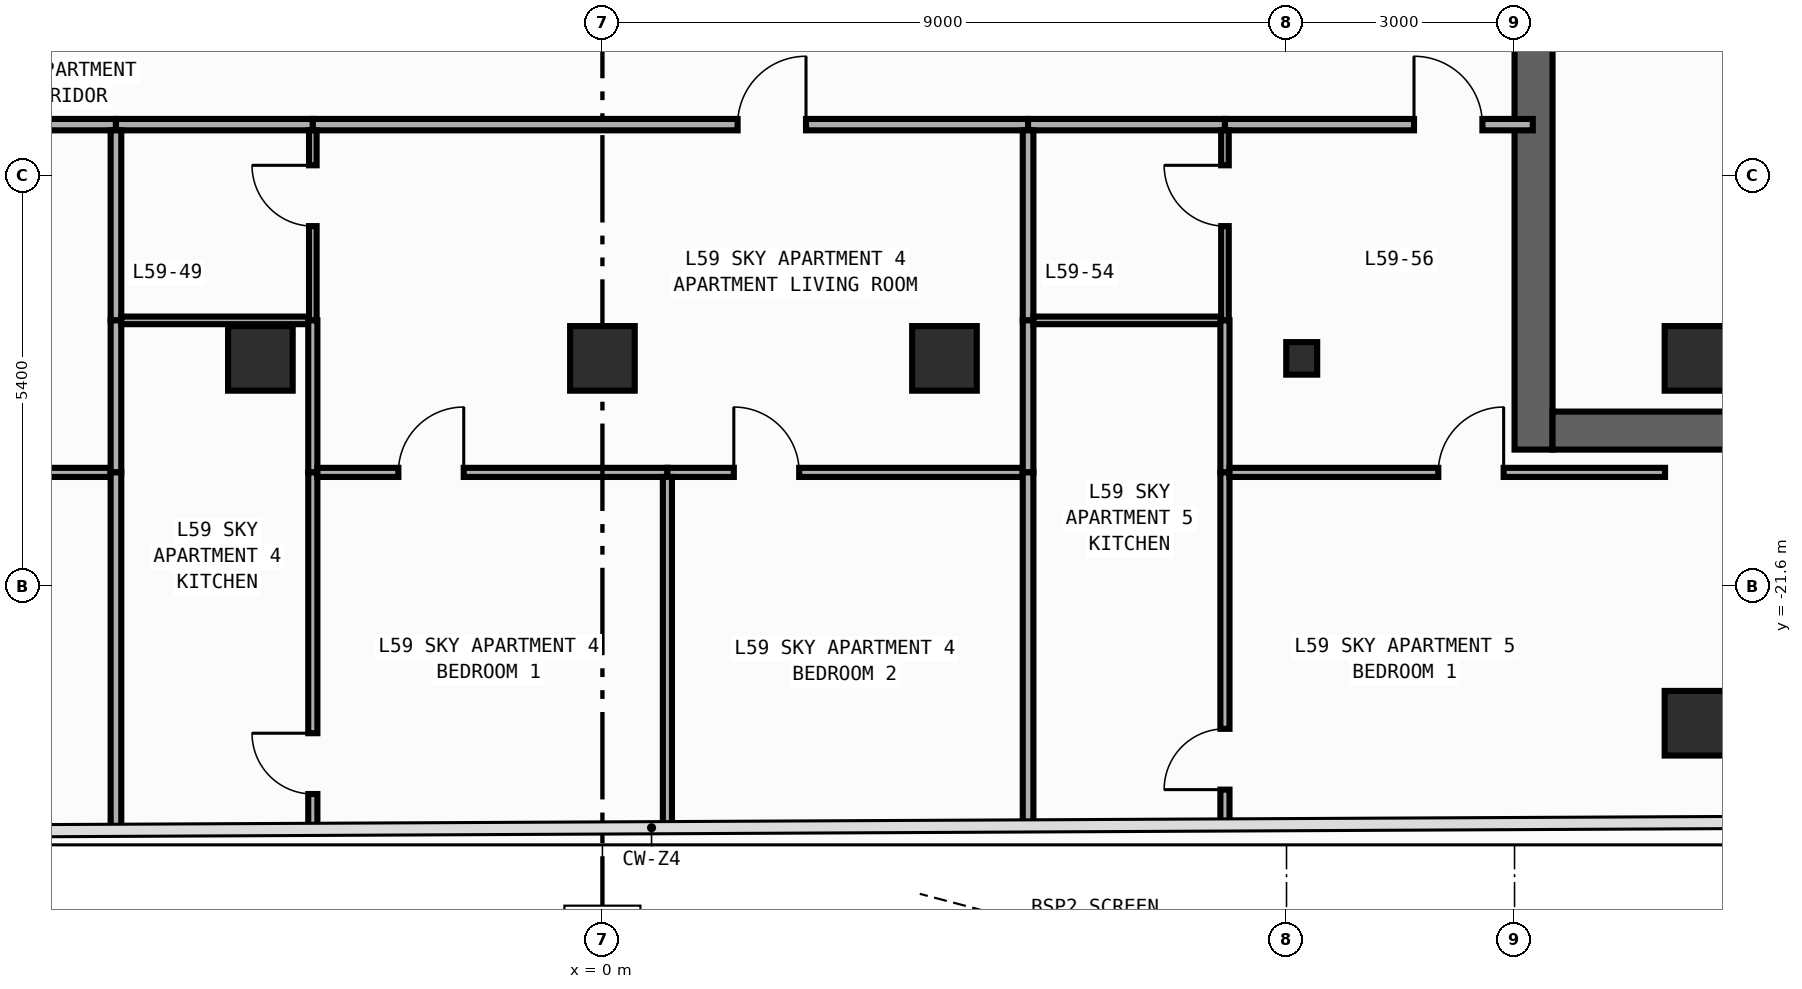
"""IFC4 building model, lengths in metres.
Left out: names, types, materials, properties, quantities, classifications, styles, units other than length and angle.
Written with IfcOpenShell. Run it as: python <this file> out.ifc"""

import sys

from ifc_helpers import new_model, si_unit, direction, frame, frame_2d, origin, origin_2d, place, context, subcontext, project, spatial, rectangle, i_section, extrude, element, fill, save


model = new_model("IFC4")
c1 = context("Model", 3, precision=1e-05, world=origin(), true_north=direction((0.0, 1.0)))
c2 = subcontext(c1, "Body", "Model", "MODEL_VIEW")
j1 = project(units=[si_unit("LENGTHUNIT", "METRE"), si_unit("PLANEANGLEUNIT", "RADIAN")], contexts=[c1])
p1 = place(None, origin())
s1 = spatial("IfcSite", under=j1, at=p1, CompositionType="ELEMENT")
p2 = place(p1, origin())
s2 = spatial("IfcBuilding", under=s1, at=p2, CompositionType="ELEMENT")
p3 = place(p2, frame((0.0, 0.0, 251.2)))
s3 = spatial("IfcBuildingStorey", under=s2, at=p3, CompositionType="ELEMENT", Elevation=251.2)
p4 = place(p3, frame((12.25, -19.8, 0.0), z_axis=(0.0, 0.0, 1.0), x_axis=(0.0, 1.0, 0.0)))
e1 = element("IfcWall", 1, at=p4, inside=s3, PredefinedType="SHEAR", context=c2, shape_type="SweptSolid", body=[
    extrude(rectangle(XDim=27.0, YDim=0.5, at=frame_2d((13.5, 0.0))), origin(), (0.0, 0.0, 1.0), 3.34),
])
p5 = place(p4, frame((23.05, 0.0, 0.0)))
e2 = element("IfcOpeningElement", 2, at=p5, cuts=e1, PredefinedType="OPENING", context=c2, shape_type="SweptSolid", body=[
    extrude(rectangle(XDim=1.1, YDim=2.2, at=frame_2d((0.55, 1.1))), frame((0.0, 0.26, 0.0), z_axis=(0.0, -1.0, 0.0), x_axis=(1.0, 0.0, 0.0)), (0.0, 0.0, 1.0), 0.52),
])
p6 = place(p4, frame((19.85, 0.0, 0.0)))
e3 = element("IfcOpeningElement", 3, at=p6, cuts=e1, PredefinedType="OPENING", context=c2, shape_type="SweptSolid", body=[
    extrude(rectangle(XDim=1.1, YDim=2.2, at=frame_2d((0.55, 1.1))), frame((0.0, 0.26, 0.0), z_axis=(0.0, -1.0, 0.0), x_axis=(1.0, 0.0, 0.0)), (0.0, 0.0, 1.0), 0.52),
])
p7 = place(p4, frame((16.65, 0.0, 0.0)))
e4 = element("IfcOpeningElement", 4, at=p7, cuts=e1, PredefinedType="OPENING", context=c2, shape_type="SweptSolid", body=[
    extrude(rectangle(XDim=1.1, YDim=2.2, at=frame_2d((0.55, 1.1))), frame((0.0, 0.26, 0.0), z_axis=(0.0, -1.0, 0.0), x_axis=(1.0, 0.0, 0.0)), (0.0, 0.0, 1.0), 0.52),
])
p8 = place(p4, frame((10.175, 0.0, 0.0)))
e5 = element("IfcOpeningElement", 5, at=p8, cuts=e1, PredefinedType="OPENING", context=c2, shape_type="SweptSolid", body=[
    extrude(rectangle(XDim=0.85, YDim=2.1, at=frame_2d((0.425, 1.05))), frame((0.0, 0.26, 0.0), z_axis=(0.0, -1.0, 0.0), x_axis=(1.0, 0.0, 0.0)), (0.0, 0.0, 1.0), 0.52),
])
p9 = place(p4, frame((12.725, 0.0, 0.0)))
e6 = element("IfcOpeningElement", 6, at=p9, cuts=e1, PredefinedType="OPENING", context=c2, shape_type="SweptSolid", body=[
    extrude(rectangle(XDim=1.15, YDim=2.2, at=frame_2d((0.575, 1.1))), frame((0.0, 0.26, 0.0), z_axis=(0.0, -1.0, 0.0), x_axis=(1.0, 0.0, 0.0)), (0.0, 0.0, 1.0), 0.52),
])
p10 = place(p4, frame((25.125, 0.0, 0.0)))
e7 = element("IfcOpeningElement", 7, at=p10, cuts=e1, PredefinedType="OPENING", context=c2, shape_type="SweptSolid", body=[
    extrude(rectangle(XDim=0.85, YDim=2.1, at=frame_2d((0.425, 1.05))), frame((0.0, 0.26, 0.0), z_axis=(0.0, -1.0, 0.0), x_axis=(1.0, 0.0, 0.0)), (0.0, 0.0, 1.0), 0.52),
])
p11 = place(p3, frame((12.5, -19.55, 0.0), z_axis=(0.0, 0.0, 1.0), x_axis=(1.0, 0.0, 0.0)))
e8 = element("IfcWall", 8, at=p11, inside=s3, PredefinedType="SHEAR", context=c2, shape_type="SweptSolid", body=[
    extrude(rectangle(XDim=7.4, YDim=0.5, at=frame_2d((3.7, 0.0))), origin(), (0.0, 0.0, 1.0), 3.34),
])
p12 = place(p3, frame((9.2, -18.6, 0.0), z_axis=(0.0, 0.0, 1.0), x_axis=(1.0, 0.0, 0.0)))
e9 = element("IfcColumn", 9, at=p12, inside=s3, PredefinedType="COLUMN", context=c2, shape_type="SweptSolid", body=[
    extrude(i_section(OverallWidth=0.407, OverallDepth=0.428, WebThickness=0.02, FlangeThickness=0.035, FilletRadius=0.022, at=origin_2d()), origin(), (0.0, 0.0, 1.0), 3.6),
])
for number, where, z_axis, x_axis in (
    (10, (14.4, -18.6, 0.0), (0.0, 0.0, 1.0), (1.0, 0.0, 0.0)),
    (11, (-4.5, -18.6, 0.0), (0.0, 0.0, 1.0), (1.0, 0.0, 0.0)),
    (12, (0.0, -18.6, 0.0), (0.0, 0.0, 1.0), (1.0, 0.0, 0.0)),
    (13, (4.5, -18.6, 0.0), (0.0, 0.0, 1.0), (1.0, 0.0, 0.0)),
    (14, (14.4, -23.4, 0.0), (0.0, 0.0, 1.0), (1.0, 0.0, 0.0)),
):
    element("IfcColumn", number, at=place(p3, frame(where, z_axis=z_axis, x_axis=x_axis)), inside=s3, PredefinedType="COLUMN", context=c2, shape_type="SweptSolid", body=[
        extrude(rectangle(XDim=0.85, YDim=0.85, at=origin_2d()), origin(), (0.0, 0.0, 1.0), 3.6),
    ])
p13 = place(p3, frame((-19.31, -15.525, 0.0), z_axis=(0.0, 0.0, 1.0), x_axis=(1.0, 0.0, 0.0)))
e15 = element("IfcWall", 15, at=p13, inside=s3, PredefinedType="PARTITIONING", context=c2, shape_type="SweptSolid", body=[
    extrude(rectangle(XDim=12.91, YDim=0.15, at=frame_2d((6.455, 0.0))), origin(), (0.0, 0.0, 1.0), 3.34),
])
p14 = place(p13, frame((1.468, 0.0, 0.0)))
e16 = element("IfcOpeningElement", 16, at=p14, cuts=e15, PredefinedType="OPENING", context=c2, shape_type="SweptSolid", body=[
    extrude(rectangle(XDim=0.9, YDim=2.15, at=frame_2d((0.45, 1.075))), frame((0.0, 0.085, 0.0), z_axis=(0.0, -1.0, 0.0), x_axis=(1.0, 0.0, 0.0)), (0.0, 0.0, 1.0), 0.17),
])
p15 = place(p3, frame((-6.4, -15.525, 0.0), z_axis=(0.0, 0.0, 1.0), x_axis=(1.0, 0.0, 0.0)))
e17 = element("IfcWall", 17, at=p15, inside=s3, PredefinedType="PARTITIONING", context=c2, shape_type="SweptSolid", body=[
    extrude(rectangle(XDim=2.59, YDim=0.15, at=frame_2d((1.295, 0.0))), origin(), (0.0, 0.0, 1.0), 3.34),
])
p16 = place(p3, frame((-3.81, -15.525, 0.0), z_axis=(0.0, 0.0, 1.0), x_axis=(1.0, 0.0, 0.0)))
e18 = element("IfcWall", 18, at=p16, inside=s3, PredefinedType="PARTITIONING", context=c2, shape_type="SweptSolid", body=[
    extrude(rectangle(XDim=9.41, YDim=0.15, at=frame_2d((4.705, 0.0))), origin(), (0.0, 0.0, 1.0), 3.34),
])
p17 = place(p16, frame((5.588, 0.0, 0.0)))
e19 = element("IfcOpeningElement", 19, at=p17, cuts=e18, PredefinedType="OPENING", context=c2, shape_type="SweptSolid", body=[
    extrude(rectangle(XDim=0.9, YDim=2.15, at=frame_2d((0.45, 1.075))), frame((0.0, 0.085, 0.0), z_axis=(0.0, -1.0, 0.0), x_axis=(1.0, 0.0, 0.0)), (0.0, 0.0, 1.0), 0.17),
])
p18 = place(p3, frame((5.6, -15.525, 0.0), z_axis=(0.0, 0.0, 1.0), x_axis=(1.0, 0.0, 0.0)))
e20 = element("IfcWall", 20, at=p18, inside=s3, PredefinedType="PARTITIONING", context=c2, shape_type="SweptSolid", body=[
    extrude(rectangle(XDim=2.59, YDim=0.15, at=frame_2d((1.295, 0.0))), origin(), (0.0, 0.0, 1.0), 3.34),
])
p19 = place(p3, frame((8.19, -15.525, 0.0), z_axis=(0.0, 0.0, 1.0), x_axis=(1.0, 0.0, 0.0)))
e21 = element("IfcWall", 21, at=p19, inside=s3, PredefinedType="PARTITIONING", context=c2, shape_type="SweptSolid", body=[
    extrude(rectangle(XDim=4.05, YDim=0.15, at=frame_2d((2.025, 0.0))), origin(), (0.0, 0.0, 1.0), 3.34),
])
p20 = place(p19, frame((2.487, 0.0, 0.0)))
e22 = element("IfcOpeningElement", 22, at=p20, cuts=e21, PredefinedType="OPENING", context=c2, shape_type="SweptSolid", body=[
    extrude(rectangle(XDim=0.9, YDim=2.15, at=frame_2d((0.45, 1.075))), frame((0.0, 0.085, 0.0), z_axis=(0.0, -1.0, 0.0), x_axis=(1.0, 0.0, 0.0)), (0.0, 0.0, 1.0), 0.17),
])
p21 = place(p3, frame((-12.895, -20.1, 0.0), z_axis=(0.0, 0.0, 1.0), x_axis=(1.0, 0.0, 0.0)))
e23 = element("IfcWall", 23, at=p21, inside=s3, PredefinedType="PARTITIONING", context=c2, shape_type="SweptSolid", body=[
    extrude(rectangle(XDim=6.425, YDim=0.12, at=frame_2d((3.212, 0.0))), origin(), (0.0, 0.0, 1.0), 3.34),
])
p22 = place(p21, frame((0.864, 0.0, 0.0)))
e24 = element("IfcOpeningElement", 24, at=p22, cuts=e23, PredefinedType="OPENING", context=c2, shape_type="SweptSolid", body=[
    extrude(rectangle(XDim=0.86, YDim=2.15, at=frame_2d((0.43, 1.075))), frame((0.0, 0.07, 0.0), z_axis=(0.0, -1.0, 0.0), x_axis=(1.0, 0.0, 0.0)), (0.0, 0.0, 1.0), 0.14),
])
p23 = place(p3, frame((-6.4, -18.1, 0.0), z_axis=(0.0, 0.0, 1.0), x_axis=(0.0, 1.0, 0.0)))
e25 = element("IfcWall", 25, at=p23, inside=s3, PredefinedType="PARTITIONING", context=c2, shape_type="SweptSolid", body=[
    extrude(rectangle(XDim=2.5, YDim=0.14, at=frame_2d((1.25, 0.0))), origin(), (0.0, 0.0, 1.0), 3.34),
])
p24 = place(p3, frame((-6.4, -20.1, 0.0), z_axis=(0.0, 0.0, 1.0), x_axis=(0.0, 1.0, 0.0)))
e26 = element("IfcWall", 26, at=p24, inside=s3, PredefinedType="PARTITIONING", context=c2, shape_type="SweptSolid", body=[
    extrude(rectangle(XDim=2.0, YDim=0.14, at=frame_2d((1.0, 0.0))), origin(), (0.0, 0.0, 1.0), 3.34),
])
p25 = place(p3, frame((-6.4, -24.804, 0.0), z_axis=(0.0, 0.0, 1.0), x_axis=(0.0, 1.0, 0.0)))
e27 = element("IfcWall", 27, at=p25, inside=s3, PredefinedType="PARTITIONING", context=c2, shape_type="SweptSolid", body=[
    extrude(rectangle(XDim=4.704, YDim=0.14, at=frame_2d((2.352, 0.0))), origin(), (0.0, 0.0, 1.0), 3.34),
])
p26 = place(p3, frame((-6.33, -18.1, 0.0), z_axis=(0.0, 0.0, 1.0), x_axis=(1.0, 0.0, 0.0)))
e28 = element("IfcWall", 28, at=p26, inside=s3, PredefinedType="PARTITIONING", context=c2, shape_type="SweptSolid", body=[
    extrude(rectangle(XDim=2.47, YDim=0.1, at=frame_2d((1.235, 0.0))), origin(), (0.0, 0.0, 1.0), 3.34),
])
p27 = place(p3, frame((-3.81, -18.1, 0.0), z_axis=(0.0, 0.0, 1.0), x_axis=(0.0, 1.0, 0.0)))
e29 = element("IfcWall", 29, at=p27, inside=s3, PredefinedType="PARTITIONING", context=c2, shape_type="SweptSolid", body=[
    extrude(rectangle(XDim=2.5, YDim=0.1, at=frame_2d((1.25, 0.0))), origin(), (0.0, 0.0, 1.0), 3.34),
])
p28 = place(p27, frame((1.24, 0.0, 0.0)))
e30 = element("IfcOpeningElement", 30, at=p28, cuts=e29, PredefinedType="OPENING", context=c2, shape_type="SweptSolid", body=[
    extrude(rectangle(XDim=0.8, YDim=2.1, at=frame_2d((0.4, 1.05))), frame((0.0, 0.06, 0.0), z_axis=(0.0, -1.0, 0.0), x_axis=(1.0, 0.0, 0.0)), (0.0, 0.0, 1.0), 0.12),
])
p29 = place(p3, frame((-3.81, -20.1, 0.0), z_axis=(0.0, 0.0, 1.0), x_axis=(0.0, 1.0, 0.0)))
e31 = element("IfcWall", 31, at=p29, inside=s3, PredefinedType="PARTITIONING", context=c2, shape_type="SweptSolid", body=[
    extrude(rectangle(XDim=2.0, YDim=0.12, at=frame_2d((1.0, 0.0))), origin(), (0.0, 0.0, 1.0), 3.34),
])
p30 = place(p3, frame((-3.81, -24.792, 0.0), z_axis=(0.0, 0.0, 1.0), x_axis=(0.0, 1.0, 0.0)))
e32 = element("IfcWall", 32, at=p30, inside=s3, PredefinedType="PARTITIONING", context=c2, shape_type="SweptSolid", body=[
    extrude(rectangle(XDim=4.691, YDim=0.12, at=frame_2d((2.346, 0.0))), origin(), (0.0, 0.0, 1.0), 3.34),
])
p31 = place(p30, frame((0.46, 0.0, 0.0)))
e33 = element("IfcOpeningElement", 33, at=p31, cuts=e32, PredefinedType="OPENING", context=c2, shape_type="SweptSolid", body=[
    extrude(rectangle(XDim=0.8, YDim=2.1, at=frame_2d((0.4, 1.05))), frame((0.0, 0.07, 0.0), z_axis=(0.0, -1.0, 0.0), x_axis=(1.0, 0.0, 0.0)), (0.0, 0.0, 1.0), 0.14),
])
p32 = place(p3, frame((-3.75, -20.1, 0.0), z_axis=(0.0, 0.0, 1.0), x_axis=(1.0, 0.0, 0.0)))
e34 = element("IfcWall", 34, at=p32, inside=s3, PredefinedType="PARTITIONING", context=c2, shape_type="SweptSolid", body=[
    extrude(rectangle(XDim=4.605, YDim=0.12, at=frame_2d((2.302, 0.0))), origin(), (0.0, 0.0, 1.0), 3.34),
])
p33 = place(p32, frame((1.065, 0.0, 0.0)))
e35 = element("IfcOpeningElement", 35, at=p33, cuts=e34, PredefinedType="OPENING", context=c2, shape_type="SweptSolid", body=[
    extrude(rectangle(XDim=0.86, YDim=2.15, at=frame_2d((0.43, 1.075))), frame((0.0, 0.07, 0.0), z_axis=(0.0, -1.0, 0.0), x_axis=(1.0, 0.0, 0.0)), (0.0, 0.0, 1.0), 0.14),
])
p34 = place(p3, frame((0.855, -20.1, 0.0), z_axis=(0.0, 0.0, 1.0), x_axis=(1.0, 0.0, 0.0)))
e36 = element("IfcWall", 36, at=p34, inside=s3, PredefinedType="PARTITIONING", context=c2, shape_type="SweptSolid", body=[
    extrude(rectangle(XDim=4.675, YDim=0.12, at=frame_2d((2.337, 0.0))), origin(), (0.0, 0.0, 1.0), 3.34),
])
p35 = place(p34, frame((0.874, 0.0, 0.0)))
e37 = element("IfcOpeningElement", 37, at=p35, cuts=e36, PredefinedType="OPENING", context=c2, shape_type="SweptSolid", body=[
    extrude(rectangle(XDim=0.86, YDim=2.15, at=frame_2d((0.43, 1.075))), frame((0.0, 0.07, 0.0), z_axis=(0.0, -1.0, 0.0), x_axis=(1.0, 0.0, 0.0)), (0.0, 0.0, 1.0), 0.14),
])
p36 = place(p3, frame((5.6, -18.1, 0.0), z_axis=(0.0, 0.0, 1.0), x_axis=(0.0, 1.0, 0.0)))
e38 = element("IfcWall", 38, at=p36, inside=s3, PredefinedType="PARTITIONING", context=c2, shape_type="SweptSolid", body=[
    extrude(rectangle(XDim=2.5, YDim=0.14, at=frame_2d((1.25, 0.0))), origin(), (0.0, 0.0, 1.0), 3.34),
])
p37 = place(p3, frame((5.6, -20.1, 0.0), z_axis=(0.0, 0.0, 1.0), x_axis=(0.0, 1.0, 0.0)))
e39 = element("IfcWall", 39, at=p37, inside=s3, PredefinedType="PARTITIONING", context=c2, shape_type="SweptSolid", body=[
    extrude(rectangle(XDim=2.0, YDim=0.14, at=frame_2d((1.0, 0.0))), origin(), (0.0, 0.0, 1.0), 3.34),
])
p38 = place(p3, frame((0.855, -24.769, 0.0), z_axis=(0.0, 0.0, 1.0), x_axis=(0.0, 1.0, 0.0)))
e40 = element("IfcWall", 40, at=p38, inside=s3, PredefinedType="PARTITIONING", context=c2, shape_type="SweptSolid", body=[
    extrude(rectangle(XDim=4.609, YDim=0.12, at=frame_2d((2.304, 0.0))), origin(), (0.0, 0.0, 1.0), 3.34),
])
p39 = place(p3, frame((5.6, -24.746, 0.0), z_axis=(0.0, 0.0, 1.0), x_axis=(0.0, 1.0, 0.0)))
e41 = element("IfcWall", 41, at=p39, inside=s3, PredefinedType="PARTITIONING", context=c2, shape_type="SweptSolid", body=[
    extrude(rectangle(XDim=4.646, YDim=0.14, at=frame_2d((2.323, 0.0))), origin(), (0.0, 0.0, 1.0), 3.34),
])
p40 = place(p3, frame((5.67, -18.1, 0.0), z_axis=(0.0, 0.0, 1.0), x_axis=(1.0, 0.0, 0.0)))
e42 = element("IfcWall", 42, at=p40, inside=s3, PredefinedType="PARTITIONING", context=c2, shape_type="SweptSolid", body=[
    extrude(rectangle(XDim=2.47, YDim=0.1, at=frame_2d((1.235, 0.0))), origin(), (0.0, 0.0, 1.0), 3.34),
])
p41 = place(p3, frame((8.19, -18.1, 0.0), z_axis=(0.0, 0.0, 1.0), x_axis=(0.0, 1.0, 0.0)))
e43 = element("IfcWall", 43, at=p41, inside=s3, PredefinedType="PARTITIONING", context=c2, shape_type="SweptSolid", body=[
    extrude(rectangle(XDim=2.5, YDim=0.1, at=frame_2d((1.25, 0.0))), origin(), (0.0, 0.0, 1.0), 3.34),
])
p42 = place(p41, frame((1.24, 0.0, 0.0)))
e44 = element("IfcOpeningElement", 44, at=p42, cuts=e43, PredefinedType="OPENING", context=c2, shape_type="SweptSolid", body=[
    extrude(rectangle(XDim=0.8, YDim=2.1, at=frame_2d((0.4, 1.05))), frame((0.0, 0.06, 0.0), z_axis=(0.0, -1.0, 0.0), x_axis=(1.0, 0.0, 0.0)), (0.0, 0.0, 1.0), 0.12),
])
p43 = place(p3, frame((8.19, -20.1, 0.0), z_axis=(0.0, 0.0, 1.0), x_axis=(0.0, 1.0, 0.0)))
e45 = element("IfcWall", 45, at=p43, inside=s3, PredefinedType="PARTITIONING", context=c2, shape_type="SweptSolid", body=[
    extrude(rectangle(XDim=2.0, YDim=0.12, at=frame_2d((1.0, 0.0))), origin(), (0.0, 0.0, 1.0), 3.34),
])
p44 = place(p3, frame((8.19, -24.733, 0.0), z_axis=(0.0, 0.0, 1.0), x_axis=(0.0, 1.0, 0.0)))
e46 = element("IfcWall", 46, at=p44, inside=s3, PredefinedType="PARTITIONING", context=c2, shape_type="SweptSolid", body=[
    extrude(rectangle(XDim=4.633, YDim=0.12, at=frame_2d((2.317, 0.0))), origin(), (0.0, 0.0, 1.0), 3.34),
])
p45 = place(p44, frame((0.46, 0.0, 0.0)))
e47 = element("IfcOpeningElement", 47, at=p45, cuts=e46, PredefinedType="OPENING", context=c2, shape_type="SweptSolid", body=[
    extrude(rectangle(XDim=0.8, YDim=2.1, at=frame_2d((0.4, 1.05))), frame((0.0, 0.07, 0.0), z_axis=(0.0, -1.0, 0.0), x_axis=(1.0, 0.0, 0.0)), (0.0, 0.0, 1.0), 0.14),
])
p46 = place(p3, frame((8.25, -20.1, 0.0), z_axis=(0.0, 0.0, 1.0), x_axis=(1.0, 0.0, 0.0)))
e48 = element("IfcWall", 48, at=p46, inside=s3, PredefinedType="PARTITIONING", context=c2, shape_type="SweptSolid", body=[
    extrude(rectangle(XDim=5.73, YDim=0.12, at=frame_2d((2.865, 0.0))), origin(), (0.0, 0.0, 1.0), 3.34),
])
p47 = place(p46, frame((2.747, 0.0, 0.0)))
e49 = element("IfcOpeningElement", 49, at=p47, cuts=e48, PredefinedType="OPENING", context=c2, shape_type="SweptSolid", body=[
    extrude(rectangle(XDim=0.86, YDim=2.15, at=frame_2d((0.43, 1.075))), frame((0.0, 0.07, 0.0), z_axis=(0.0, -1.0, 0.0), x_axis=(1.0, 0.0, 0.0)), (0.0, 0.0, 1.0), 0.14),
])
p48 = place(p17, origin())
e50 = element("IfcDoor", 50, at=p48, inside=s3, OperationType="SINGLE_SWING_RIGHT", PredefinedType="DOOR", context=c2, shape_type="SweptSolid", body=[
    extrude(rectangle(XDim=0.9, YDim=2.15, at=frame_2d((0.45, 1.075))), frame((0.0, 0.025, 0.0), z_axis=(0.0, -1.0, 0.0), x_axis=(1.0, 0.0, 0.0)), (0.0, 0.0, 1.0), 0.05),
])
fill(e19, e50)
p49 = place(p20, origin())
e51 = element("IfcDoor", 51, at=p49, inside=s3, OperationType="SINGLE_SWING_LEFT", PredefinedType="DOOR", context=c2, shape_type="SweptSolid", body=[
    extrude(rectangle(XDim=0.9, YDim=2.15, at=frame_2d((0.45, 1.075))), frame((0.0, 0.025, 0.0), z_axis=(0.0, -1.0, 0.0), x_axis=(1.0, 0.0, 0.0)), (0.0, 0.0, 1.0), 0.05),
])
fill(e22, e51)
p50 = place(p28, origin())
e52 = element("IfcDoor", 52, at=p50, inside=s3, OperationType="SINGLE_SWING_RIGHT", PredefinedType="DOOR", context=c2, shape_type="SweptSolid", body=[
    extrude(rectangle(XDim=0.8, YDim=2.1, at=frame_2d((0.4, 1.05))), frame((0.0, 0.025, 0.0), z_axis=(0.0, -1.0, 0.0), x_axis=(1.0, 0.0, 0.0)), (0.0, 0.0, 1.0), 0.05),
])
fill(e30, e52)
p51 = place(p33, origin())
e53 = element("IfcDoor", 53, at=p51, inside=s3, OperationType="SINGLE_SWING_RIGHT", PredefinedType="DOOR", context=c2, shape_type="SweptSolid", body=[
    extrude(rectangle(XDim=0.86, YDim=2.15, at=frame_2d((0.43, 1.075))), frame((0.0, 0.025, 0.0), z_axis=(0.0, -1.0, 0.0), x_axis=(1.0, 0.0, 0.0)), (0.0, 0.0, 1.0), 0.05),
])
fill(e35, e53)
p52 = place(p35, origin())
e54 = element("IfcDoor", 54, at=p52, inside=s3, OperationType="SINGLE_SWING_LEFT", PredefinedType="DOOR", context=c2, shape_type="SweptSolid", body=[
    extrude(rectangle(XDim=0.86, YDim=2.15, at=frame_2d((0.43, 1.075))), frame((0.0, 0.025, 0.0), z_axis=(0.0, -1.0, 0.0), x_axis=(1.0, 0.0, 0.0)), (0.0, 0.0, 1.0), 0.05),
])
fill(e37, e54)
p53 = place(p42, origin())
e55 = element("IfcDoor", 55, at=p53, inside=s3, OperationType="SINGLE_SWING_RIGHT", PredefinedType="DOOR", context=c2, shape_type="SweptSolid", body=[
    extrude(rectangle(XDim=0.8, YDim=2.1, at=frame_2d((0.4, 1.05))), frame((0.0, 0.025, 0.0), z_axis=(0.0, -1.0, 0.0), x_axis=(1.0, 0.0, 0.0)), (0.0, 0.0, 1.0), 0.05),
])
fill(e44, e55)
p54 = place(p47, origin())
e56 = element("IfcDoor", 56, at=p54, inside=s3, OperationType="SINGLE_SWING_RIGHT", PredefinedType="DOOR", context=c2, shape_type="SweptSolid", body=[
    extrude(rectangle(XDim=0.86, YDim=2.15, at=frame_2d((0.43, 1.075))), frame((0.0, 0.025, 0.0), z_axis=(0.0, -1.0, 0.0), x_axis=(1.0, 0.0, 0.0)), (0.0, 0.0, 1.0), 0.05),
])
fill(e49, e56)
p55 = place(p31, origin())
e57 = element("IfcDoor", 57, at=p55, inside=s3, OperationType="SINGLE_SWING_RIGHT", PredefinedType="DOOR", context=c2, shape_type="SweptSolid", body=[
    extrude(rectangle(XDim=0.8, YDim=2.1, at=frame_2d((0.4, 1.05))), frame((0.0, 0.025, 0.0), z_axis=(0.0, -1.0, 0.0), x_axis=(1.0, 0.0, 0.0)), (0.0, 0.0, 1.0), 0.05),
])
fill(e33, e57)
p56 = place(p45, origin())
e58 = element("IfcDoor", 58, at=p56, inside=s3, OperationType="SINGLE_SWING_LEFT", PredefinedType="DOOR", context=c2, shape_type="SweptSolid", body=[
    extrude(rectangle(XDim=0.8, YDim=2.1, at=frame_2d((0.4, 1.05))), frame((0.0, 0.025, 0.0), z_axis=(0.0, -1.0, 0.0), x_axis=(1.0, 0.0, 0.0)), (0.0, 0.0, 1.0), 0.05),
])
fill(e47, e58)
save(model, sys.argv[1])
